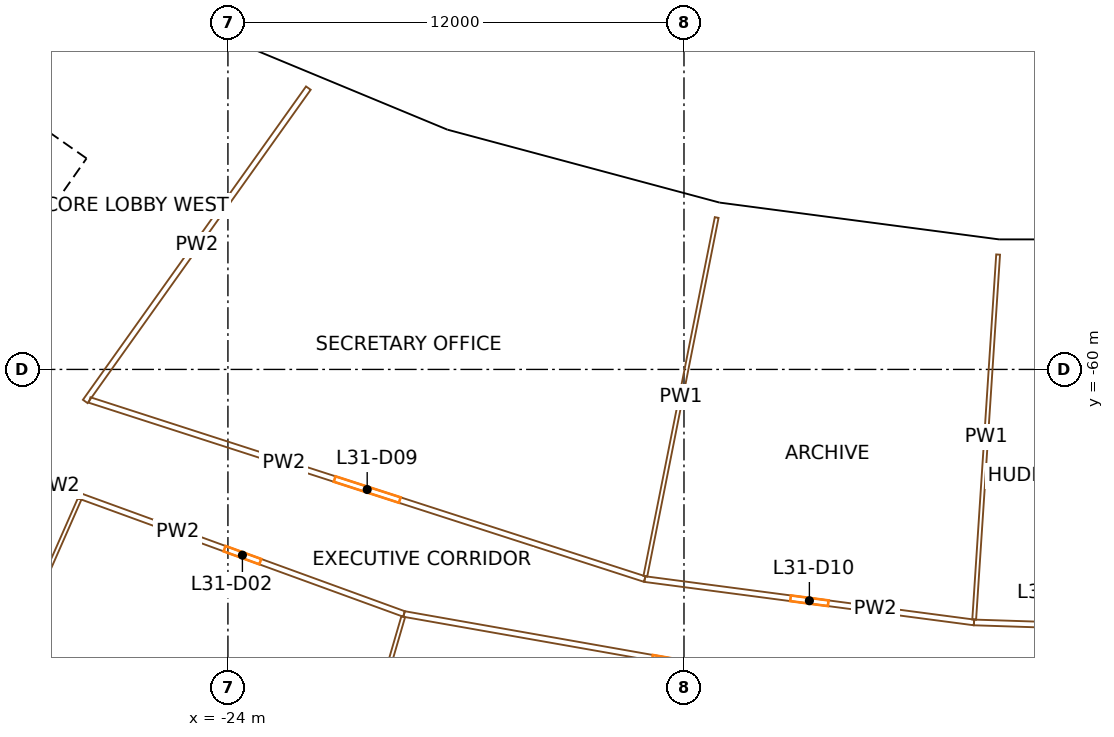
"""IFC4 building model, lengths in metres.
Left out: names, types, materials, properties, quantities, classifications, styles, units other than length and angle.
Written with IfcOpenShell. Run it as: python <this file> out.ifc"""

import sys

from ifc_helpers import new_model, si_unit, direction, frame, frame_2d, origin, origin_2d, place, context, subcontext, project, spatial, rectangle, extrude, element, fill, save


model = new_model("IFC4")
c1 = context("Model", 3, precision=1e-05, world=origin(), true_north=direction((0.0, 1.0)))
c2 = subcontext(c1, "Body", "Model", "MODEL_VIEW")
j1 = project(units=[si_unit("LENGTHUNIT", "METRE"), si_unit("PLANEANGLEUNIT", "RADIAN")], contexts=[c1])
p1 = place(None, origin())
s1 = spatial("IfcSite", under=j1, at=p1, CompositionType="ELEMENT")
p2 = place(p1, origin())
s2 = spatial("IfcBuilding", under=s1, at=p2, CompositionType="ELEMENT")
p3 = place(p2, frame((0.0, 0.0, 136.7)))
s3 = spatial("IfcBuildingStorey", under=s2, at=p3, CompositionType="ELEMENT", Elevation=136.7)
for number, where, z_axis, x_axis in (
    (1, (-25.763, -52.243, 0.0), (0.0, 0.0, 1.0), (0.897, -0.442, 0.0)),
    (2, (-18.724, -55.159, 0.0), (0.0, 0.0, 1.0), (0.947, -0.321, 0.0)),
    (3, (-11.364, -57.131, 0.0), (0.0, 0.0, 1.0), (0.981, -0.195, 0.0)),
    (4, (-3.81, -58.125, 0.0), (0.0, 0.0, 1.0), (0.998, -0.065, 0.0)),
):
    element("IfcColumn", number, at=place(p3, frame(where, z_axis=z_axis, x_axis=x_axis)), inside=s3, PredefinedType="COLUMN", context=c2, shape_type="SweptSolid", body=[
        extrude(rectangle(XDim=1.2, YDim=1.5, at=origin_2d()), origin(), (0.0, 0.0, 1.0), 3.8),
    ])
p4 = place(p3, frame((-36.717, -66.337, 0.0), z_axis=(0.0, 0.0, 1.0), x_axis=(0.573577477574, 0.819151315216, 0.0)))
e5 = element("IfcWall", 5, at=p4, inside=s3, PredefinedType="SHEAR", context=c2, shape_type="SweptSolid", body=[
    extrude(rectangle(XDim=14.8, YDim=0.9, at=frame_2d((7.4, 0.0))), origin(), (0.0, 0.0, 1.0), 3.5),
])
p5 = place(p4, frame((6.2, 0.0, 0.0)))
e6 = element("IfcOpeningElement", 6, at=p5, cuts=e5, PredefinedType="OPENING", context=c2, shape_type="SweptSolid", body=[
    extrude(rectangle(XDim=2.4, YDim=2.1, at=frame_2d((1.2, 1.05))), frame((0.0, 0.46, 0.0), z_axis=(0.0, -1.0, 0.0), x_axis=(1.0, 0.0, 0.0)), (0.0, 0.0, 1.0), 0.92),
])
p6 = place(p3, frame((-28.854, -54.324, 0.0), z_axis=(0.0, 0.0, 1.0), x_axis=(-0.819145767589, 0.573585400304, 0.0)))
e7 = element("IfcWall", 7, at=p6, inside=s3, PredefinedType="SHEAR", context=c2, shape_type="SweptSolid", body=[
    extrude(rectangle(XDim=15.045, YDim=0.9, at=frame_2d((7.523, 0.0))), origin(), (0.0, 0.0, 1.0), 3.5),
])
p7 = place(p6, frame((0.5, 0.0, 0.0)))
e8 = element("IfcOpeningElement", 8, at=p7, cuts=e7, PredefinedType="OPENING", context=c2, shape_type="SweptSolid", body=[
    extrude(rectangle(XDim=1.0, YDim=2.1, at=frame_2d((0.5, 1.05))), frame((0.0, 0.46, 0.0), z_axis=(0.0, -1.0, 0.0), x_axis=(1.0, 0.0, 0.0)), (0.0, 0.0, 1.0), 0.92),
])
p8 = place(p6, frame((2.625, 0.0, 0.0)))
e9 = element("IfcOpeningElement", 9, at=p8, cuts=e7, PredefinedType="OPENING", context=c2, shape_type="SweptSolid", body=[
    extrude(rectangle(XDim=1.0, YDim=2.1, at=frame_2d((0.5, 1.05))), frame((0.0, 0.46, 0.0), z_axis=(0.0, -1.0, 0.0), x_axis=(1.0, 0.0, 0.0)), (0.0, 0.0, 1.0), 0.92),
])
p9 = place(p6, frame((5.625, 0.0, 0.0)))
e10 = element("IfcOpeningElement", 10, at=p9, cuts=e7, PredefinedType="OPENING", context=c2, shape_type="SweptSolid", body=[
    extrude(rectangle(XDim=0.9, YDim=2.1, at=frame_2d((0.45, 1.05))), frame((0.0, 0.46, 0.0), z_axis=(0.0, -1.0, 0.0), x_axis=(1.0, 0.0, 0.0)), (0.0, 0.0, 1.0), 0.92),
])
p10 = place(p6, frame((13.495, 0.0, 0.0)))
e11 = element("IfcOpeningElement", 11, at=p10, cuts=e7, PredefinedType="OPENING", context=c2, shape_type="SweptSolid", body=[
    extrude(rectangle(XDim=1.1, YDim=2.1, at=frame_2d((0.55, 1.05))), frame((0.0, 0.46, 0.0), z_axis=(0.0, -1.0, 0.0), x_axis=(1.0, 0.0, 0.0)), (0.0, 0.0, 1.0), 0.92),
])
p11 = place(p3, frame((-18.267, -53.89, 0.0), z_axis=(0.0, 0.0, 1.0), x_axis=(-0.923879826967, 0.382682721486, 0.0)))
e12 = element("IfcWall", 12, at=p11, inside=s3, PredefinedType="SOLIDWALL", context=c2, shape_type="SweptSolid", body=[
    extrude(rectangle(XDim=7.493, YDim=0.4, at=frame_2d((3.747, 0.0))), origin(), (0.0, 0.0, 1.0), 2.7),
])
p12 = place(p11, frame((4.301, 0.0, 0.9)))
e13 = element("IfcOpeningElement", 13, at=p12, cuts=e12, PredefinedType="OPENING", context=c2, shape_type="SweptSolid", body=[
    extrude(rectangle(XDim=2.6, YDim=1.65, at=frame_2d((1.3, 0.825))), frame((0.0, 0.21, 0.0), z_axis=(0.0, -1.0, 0.0), x_axis=(1.0, 0.0, 0.0)), (0.0, 0.0, 1.0), 0.42),
])
p13 = place(p11, frame((0.592, 0.0, 0.9)))
e14 = element("IfcOpeningElement", 14, at=p13, cuts=e12, PredefinedType="OPENING", context=c2, shape_type="SweptSolid", body=[
    extrude(rectangle(XDim=2.6, YDim=1.65, at=frame_2d((1.3, 0.825))), frame((0.0, 0.21, 0.0), z_axis=(0.0, -1.0, 0.0), x_axis=(1.0, 0.0, 0.0)), (0.0, 0.0, 1.0), 0.42),
])
p14 = place(p3, frame((-11.15, -55.794, 0.0), z_axis=(0.0, 0.0, 1.0), x_axis=(-0.965924597867, 0.258823629594, 0.0)))
e15 = element("IfcWall", 15, at=p14, inside=s3, PredefinedType="SOLIDWALL", context=c2, shape_type="SweptSolid", body=[
    extrude(rectangle(XDim=7.342, YDim=0.4, at=frame_2d((3.671, 0.0))), origin(), (0.0, 0.0, 1.0), 2.7),
])
p15 = place(p14, frame((4.225, 0.0, 0.9)))
e16 = element("IfcOpeningElement", 16, at=p15, cuts=e15, PredefinedType="OPENING", context=c2, shape_type="SweptSolid", body=[
    extrude(rectangle(XDim=2.6, YDim=1.65, at=frame_2d((1.3, 0.825))), frame((0.0, 0.21, 0.0), z_axis=(0.0, -1.0, 0.0), x_axis=(1.0, 0.0, 0.0)), (0.0, 0.0, 1.0), 0.42),
])
p16 = place(p14, frame((0.517, 0.0, 0.9)))
e17 = element("IfcOpeningElement", 17, at=p16, cuts=e15, PredefinedType="OPENING", context=c2, shape_type="SweptSolid", body=[
    extrude(rectangle(XDim=2.6, YDim=1.65, at=frame_2d((1.3, 0.825))), frame((0.0, 0.21, 0.0), z_axis=(0.0, -1.0, 0.0), x_axis=(1.0, 0.0, 0.0)), (0.0, 0.0, 1.0), 0.42),
])
p17 = place(p3, frame((-3.697, -56.782, 0.0), z_axis=(0.0, 0.0, 1.0), x_axis=(-0.991444533306, 0.130528684121, 0.0)))
e18 = element("IfcWall", 18, at=p17, inside=s3, PredefinedType="SOLIDWALL", context=c2, shape_type="SweptSolid", body=[
    extrude(rectangle(XDim=7.493, YDim=0.4, at=frame_2d((3.747, 0.0))), origin(), (0.0, 0.0, 1.0), 2.7),
])
p18 = place(p17, frame((4.301, 0.0, 0.9)))
e19 = element("IfcOpeningElement", 19, at=p18, cuts=e18, PredefinedType="OPENING", context=c2, shape_type="SweptSolid", body=[
    extrude(rectangle(XDim=2.6, YDim=1.65, at=frame_2d((1.3, 0.825))), frame((0.0, 0.21, 0.0), z_axis=(0.0, -1.0, 0.0), x_axis=(1.0, 0.0, 0.0)), (0.0, 0.0, 1.0), 0.42),
])
p19 = place(p17, frame((0.592, 0.0, 0.9)))
e20 = element("IfcOpeningElement", 20, at=p19, cuts=e18, PredefinedType="OPENING", context=c2, shape_type="SweptSolid", body=[
    extrude(rectangle(XDim=2.6, YDim=1.65, at=frame_2d((1.3, 0.825))), frame((0.0, 0.21, 0.0), z_axis=(0.0, -1.0, 0.0), x_axis=(1.0, 0.0, 0.0)), (0.0, 0.0, 1.0), 0.42),
])
p20 = place(p3, frame((3.671, -56.779, 0.0), z_axis=(0.0, 0.0, 1.0), x_axis=(-1.0, 0.0, 0.0)))
e21 = element("IfcWall", 21, at=p20, inside=s3, PredefinedType="SOLIDWALL", context=c2, shape_type="SweptSolid", body=[
    extrude(rectangle(XDim=7.341, YDim=0.4, at=frame_2d((3.671, 0.0))), origin(), (0.0, 0.0, 1.0), 2.7),
])
p21 = place(p20, frame((4.225, 0.0, 0.9)))
e22 = element("IfcOpeningElement", 22, at=p21, cuts=e21, PredefinedType="OPENING", context=c2, shape_type="SweptSolid", body=[
    extrude(rectangle(XDim=2.6, YDim=1.65, at=frame_2d((1.3, 0.825))), frame((0.0, 0.21, 0.0), z_axis=(0.0, -1.0, 0.0), x_axis=(1.0, 0.0, 0.0)), (0.0, 0.0, 1.0), 0.42),
])
p22 = place(p20, frame((0.517, 0.0, 0.9)))
e23 = element("IfcOpeningElement", 23, at=p22, cuts=e21, PredefinedType="OPENING", context=c2, shape_type="SweptSolid", body=[
    extrude(rectangle(XDim=2.6, YDim=1.65, at=frame_2d((1.3, 0.825))), frame((0.0, 0.21, 0.0), z_axis=(0.0, -1.0, 0.0), x_axis=(1.0, 0.0, 0.0)), (0.0, 0.0, 1.0), 0.42),
])
p23 = place(p3, frame((-31.799, -72.262, 0.0), z_axis=(0.0, 0.0, 1.0), x_axis=(0.402773288685, 0.915299774894, 0.0)))
e24 = element("IfcWall", 24, at=p23, inside=s3, PredefinedType="PARTITIONING", context=c2, shape_type="SweptSolid", body=[
    extrude(rectangle(XDim=9.674, YDim=0.1, at=frame_2d((4.837, 0.0))), origin(), (0.0, 0.0, 1.0), 2.4),
])
p24 = place(p3, frame((-29.059, -62.802, 0.0), z_axis=(0.0, 0.0, 1.0), x_axis=(0.911173247906, -0.412023436592, 0.0)))
e25 = element("IfcWall", 25, at=p24, inside=s3, PredefinedType="PARTITIONING", context=c2, shape_type="SweptSolid", body=[
    extrude(rectangle(XDim=1.303, YDim=0.15, at=frame_2d((0.651, 0.0))), origin(), (0.0, 0.0, 1.0), 2.4),
])
p25 = place(p3, frame((-19.366, -66.435, 0.0), z_axis=(0.0, 0.0, 1.0), x_axis=(-0.939690219257, 0.342026741401, 0.0)))
e26 = element("IfcWall", 26, at=p25, inside=s3, PredefinedType="PARTITIONING", context=c2, shape_type="SweptSolid", body=[
    extrude(rectangle(XDim=9.052, YDim=0.15, at=frame_2d((4.526, 0.0))), origin(), (0.0, 0.0, 1.0), 2.4),
])
p26 = place(p25, frame((4.026, 0.0, 0.0)))
e27 = element("IfcOpeningElement", 27, at=p26, cuts=e26, PredefinedType="OPENING", context=c2, shape_type="SweptSolid", body=[
    extrude(rectangle(XDim=1.0, YDim=2.1, at=frame_2d((0.5, 1.05))), frame((0.0, 0.085, 0.0), z_axis=(0.0, -1.0, 0.0), x_axis=(1.0, 0.0, 0.0)), (0.0, 0.0, 1.0), 0.17),
])
p27 = place(p3, frame((-27.639, -60.804, 0.0), z_axis=(0.0, 0.0, 1.0), x_axis=(0.951705469381, -0.307012539729, 0.0)))
e28 = element("IfcWall", 28, at=p27, inside=s3, PredefinedType="PARTITIONING", context=c2, shape_type="SweptSolid", body=[
    extrude(rectangle(XDim=15.348, YDim=0.15, at=frame_2d((7.674, 0.0))), origin(), (0.0, 0.0, 1.0), 2.4),
])
p28 = place(p27, frame((6.774, 0.0, 0.0)))
e29 = element("IfcOpeningElement", 29, at=p28, cuts=e28, PredefinedType="OPENING", context=c2, shape_type="SweptSolid", body=[
    extrude(rectangle(XDim=1.8, YDim=2.1, at=frame_2d((0.9, 1.05))), frame((0.0, 0.085, 0.0), z_axis=(0.0, -1.0, 0.0), x_axis=(1.0, 0.0, 0.0)), (0.0, 0.0, 1.0), 0.17),
])
p29 = place(p3, frame((-22.094, -75.794, 0.0), z_axis=(0.0, 0.0, 1.0), x_axis=(0.279846881911, 0.960044646194, 0.0)))
e30 = element("IfcWall", 30, at=p29, inside=s3, PredefinedType="PARTITIONING", context=c2, shape_type="SweptSolid", body=[
    extrude(rectangle(XDim=9.674, YDim=0.1, at=frame_2d((4.837, 0.0))), origin(), (0.0, 0.0, 1.0), 2.4),
])
p30 = place(p3, frame((-21.884, -52.598, 0.0), z_axis=(0.0, 0.0, 1.0), x_axis=(-0.580016763963, -0.814604538118, 0.0)))
e31 = element("IfcWall", 31, at=p30, inside=s3, PredefinedType="PARTITIONING", context=c2, shape_type="SweptSolid", body=[
    extrude(rectangle(XDim=10.121, YDim=0.15, at=frame_2d((5.061, 0.0))), origin(), (0.0, 0.0, 1.0), 2.4),
])
p31 = place(p3, frame((-4.526, -69.052, 0.0), z_axis=(0.0, 0.0, 1.0), x_axis=(-0.984805080703, 0.173663332402, 0.0)))
e32 = element("IfcWall", 32, at=p31, inside=s3, PredefinedType="PARTITIONING", context=c2, shape_type="SweptSolid", body=[
    extrude(rectangle(XDim=15.069, YDim=0.15, at=frame_2d((7.535, 0.0))), origin(), (0.0, 0.0, 1.0), 2.4),
])
p32 = place(p31, frame((6.635, 0.0, 0.0)))
e33 = element("IfcOpeningElement", 33, at=p32, cuts=e32, PredefinedType="OPENING", context=c2, shape_type="SweptSolid", body=[
    extrude(rectangle(XDim=1.8, YDim=2.1, at=frame_2d((0.9, 1.05))), frame((0.0, 0.085, 0.0), z_axis=(0.0, -1.0, 0.0), x_axis=(1.0, 0.0, 0.0)), (0.0, 0.0, 1.0), 0.17),
])
p33 = place(p3, frame((-13.032, -65.516, 0.0), z_axis=(0.0, 0.0, 1.0), x_axis=(0.991443260322, -0.130538352841, 0.0)))
e34 = element("IfcWall", 34, at=p33, inside=s3, PredefinedType="PARTITIONING", context=c2, shape_type="SweptSolid", body=[
    extrude(rectangle(XDim=8.738, YDim=0.15, at=frame_2d((4.369, 0.0))), origin(), (0.0, 0.0, 1.0), 2.4),
])
p34 = place(p33, frame((3.869, 0.0, 0.0)))
e35 = element("IfcOpeningElement", 35, at=p34, cuts=e34, PredefinedType="OPENING", context=c2, shape_type="SweptSolid", body=[
    extrude(rectangle(XDim=1.0, YDim=2.1, at=frame_2d((0.5, 1.05))), frame((0.0, 0.085, 0.0), z_axis=(0.0, -1.0, 0.0), x_axis=(1.0, 0.0, 0.0)), (0.0, 0.0, 1.0), 0.17),
])
p35 = place(p3, frame((-11.14, -56.003, 0.0), z_axis=(0.0, 0.0, 1.0), x_axis=(-0.195086769421, -0.980785987052, 0.0)))
e36 = element("IfcWall", 36, at=p35, inside=s3, PredefinedType="PARTITIONING", context=c2, shape_type="SweptSolid", body=[
    extrude(rectangle(XDim=9.625, YDim=0.1, at=frame_2d((4.812, 0.0))), origin(), (0.0, 0.0, 1.0), 2.4),
])
p36 = place(p3, frame((-4.369, -66.657, 0.0), z_axis=(0.0, 0.0, 1.0), x_axis=(0.99946426167, -0.03272903366, 0.0)))
e37 = element("IfcWall", 37, at=p36, inside=s3, PredefinedType="PARTITIONING", context=c2, shape_type="SweptSolid", body=[
    extrude(rectangle(XDim=4.371, YDim=0.15, at=frame_2d((2.186, 0.0))), origin(), (0.0, 0.0, 1.0), 2.4),
])
p37 = place(p36, frame((1.736, 0.0, 0.0)))
e38 = element("IfcOpeningElement", 38, at=p37, cuts=e37, PredefinedType="OPENING", context=c2, shape_type="SweptSolid", body=[
    extrude(rectangle(XDim=0.9, YDim=2.1, at=frame_2d((0.45, 1.05))), frame((0.0, 0.085, 0.0), z_axis=(0.0, -1.0, 0.0), x_axis=(1.0, 0.0, 0.0)), (0.0, 0.0, 1.0), 0.17),
])
p38 = place(p3, frame((-3.735, -56.978, 0.0), z_axis=(0.0, 0.0, 1.0), x_axis=(-0.065392665599, -0.997859609006, 0.0)))
e39 = element("IfcWall", 39, at=p38, inside=s3, PredefinedType="PARTITIONING", context=c2, shape_type="SweptSolid", body=[
    extrude(rectangle(XDim=9.625, YDim=0.1, at=frame_2d((4.812, 0.0))), origin(), (0.0, 0.0, 1.0), 2.4),
])
p39 = place(p12, origin())
e40 = element("IfcWindow", 40, at=p39, inside=s3, PartitioningType="SINGLE_PANEL", PredefinedType="WINDOW", context=c2, shape_type="SweptSolid", body=[
    extrude(rectangle(XDim=2.6, YDim=1.65, at=frame_2d((1.3, 0.825))), frame((0.0, 0.03, 0.0), z_axis=(0.0, -1.0, 0.0), x_axis=(1.0, 0.0, 0.0)), (0.0, 0.0, 1.0), 0.06),
])
fill(e13, e40)
p40 = place(p13, origin())
e41 = element("IfcWindow", 41, at=p40, inside=s3, PartitioningType="SINGLE_PANEL", PredefinedType="WINDOW", context=c2, shape_type="SweptSolid", body=[
    extrude(rectangle(XDim=2.6, YDim=1.65, at=frame_2d((1.3, 0.825))), frame((0.0, 0.03, 0.0), z_axis=(0.0, -1.0, 0.0), x_axis=(1.0, 0.0, 0.0)), (0.0, 0.0, 1.0), 0.06),
])
fill(e14, e41)
p41 = place(p15, origin())
e42 = element("IfcWindow", 42, at=p41, inside=s3, PartitioningType="SINGLE_PANEL", PredefinedType="WINDOW", context=c2, shape_type="SweptSolid", body=[
    extrude(rectangle(XDim=2.6, YDim=1.65, at=frame_2d((1.3, 0.825))), frame((0.0, 0.03, 0.0), z_axis=(0.0, -1.0, 0.0), x_axis=(1.0, 0.0, 0.0)), (0.0, 0.0, 1.0), 0.06),
])
fill(e16, e42)
p42 = place(p16, origin())
e43 = element("IfcWindow", 43, at=p42, inside=s3, PartitioningType="SINGLE_PANEL", PredefinedType="WINDOW", context=c2, shape_type="SweptSolid", body=[
    extrude(rectangle(XDim=2.6, YDim=1.65, at=frame_2d((1.3, 0.825))), frame((0.0, 0.03, 0.0), z_axis=(0.0, -1.0, 0.0), x_axis=(1.0, 0.0, 0.0)), (0.0, 0.0, 1.0), 0.06),
])
fill(e17, e43)
p43 = place(p18, origin())
e44 = element("IfcWindow", 44, at=p43, inside=s3, PartitioningType="SINGLE_PANEL", PredefinedType="WINDOW", context=c2, shape_type="SweptSolid", body=[
    extrude(rectangle(XDim=2.6, YDim=1.65, at=frame_2d((1.3, 0.825))), frame((0.0, 0.03, 0.0), z_axis=(0.0, -1.0, 0.0), x_axis=(1.0, 0.0, 0.0)), (0.0, 0.0, 1.0), 0.06),
])
fill(e19, e44)
p44 = place(p19, origin())
e45 = element("IfcWindow", 45, at=p44, inside=s3, PartitioningType="SINGLE_PANEL", PredefinedType="WINDOW", context=c2, shape_type="SweptSolid", body=[
    extrude(rectangle(XDim=2.6, YDim=1.65, at=frame_2d((1.3, 0.825))), frame((0.0, 0.03, 0.0), z_axis=(0.0, -1.0, 0.0), x_axis=(1.0, 0.0, 0.0)), (0.0, 0.0, 1.0), 0.06),
])
fill(e20, e45)
p45 = place(p21, origin())
e46 = element("IfcWindow", 46, at=p45, inside=s3, PartitioningType="SINGLE_PANEL", PredefinedType="WINDOW", context=c2, shape_type="SweptSolid", body=[
    extrude(rectangle(XDim=2.6, YDim=1.65, at=frame_2d((1.3, 0.825))), frame((0.0, 0.03, 0.0), z_axis=(0.0, -1.0, 0.0), x_axis=(1.0, 0.0, 0.0)), (0.0, 0.0, 1.0), 0.06),
])
fill(e22, e46)
p46 = place(p26, origin())
e47 = element("IfcDoor", 47, at=p46, inside=s3, OperationType="SINGLE_SWING_RIGHT", PredefinedType="DOOR", context=c2, shape_type="SweptSolid", body=[
    extrude(rectangle(XDim=1.0, YDim=2.1, at=frame_2d((0.5, 1.05))), frame((0.0, 0.025, 0.0), z_axis=(0.0, -1.0, 0.0), x_axis=(1.0, 0.0, 0.0)), (0.0, 0.0, 1.0), 0.05),
])
fill(e27, e47)
p47 = place(p32, origin())
e48 = element("IfcDoor", 48, at=p47, inside=s3, OperationType="DOUBLE_DOOR_SINGLE_SWING", PredefinedType="DOOR", context=c2, shape_type="SweptSolid", body=[
    extrude(rectangle(XDim=1.8, YDim=2.1, at=frame_2d((0.9, 1.05))), frame((0.0, 0.025, 0.0), z_axis=(0.0, -1.0, 0.0), x_axis=(1.0, 0.0, 0.0)), (0.0, 0.0, 1.0), 0.05),
])
fill(e33, e48)
p48 = place(p28, origin())
e49 = element("IfcDoor", 49, at=p48, inside=s3, OperationType="DOUBLE_DOOR_SINGLE_SWING", PredefinedType="DOOR", context=c2, shape_type="SweptSolid", body=[
    extrude(rectangle(XDim=1.8, YDim=2.1, at=frame_2d((0.9, 1.05))), frame((0.0, 0.025, 0.0), z_axis=(0.0, -1.0, 0.0), x_axis=(1.0, 0.0, 0.0)), (0.0, 0.0, 1.0), 0.05),
])
fill(e29, e49)
p49 = place(p34, origin())
e50 = element("IfcDoor", 50, at=p49, inside=s3, OperationType="SINGLE_SWING_RIGHT", PredefinedType="DOOR", context=c2, shape_type="SweptSolid", body=[
    extrude(rectangle(XDim=1.0, YDim=2.1, at=frame_2d((0.5, 1.05))), frame((0.0, 0.025, 0.0), z_axis=(0.0, -1.0, 0.0), x_axis=(1.0, 0.0, 0.0)), (0.0, 0.0, 1.0), 0.05),
])
fill(e35, e50)
save(model, sys.argv[1])
